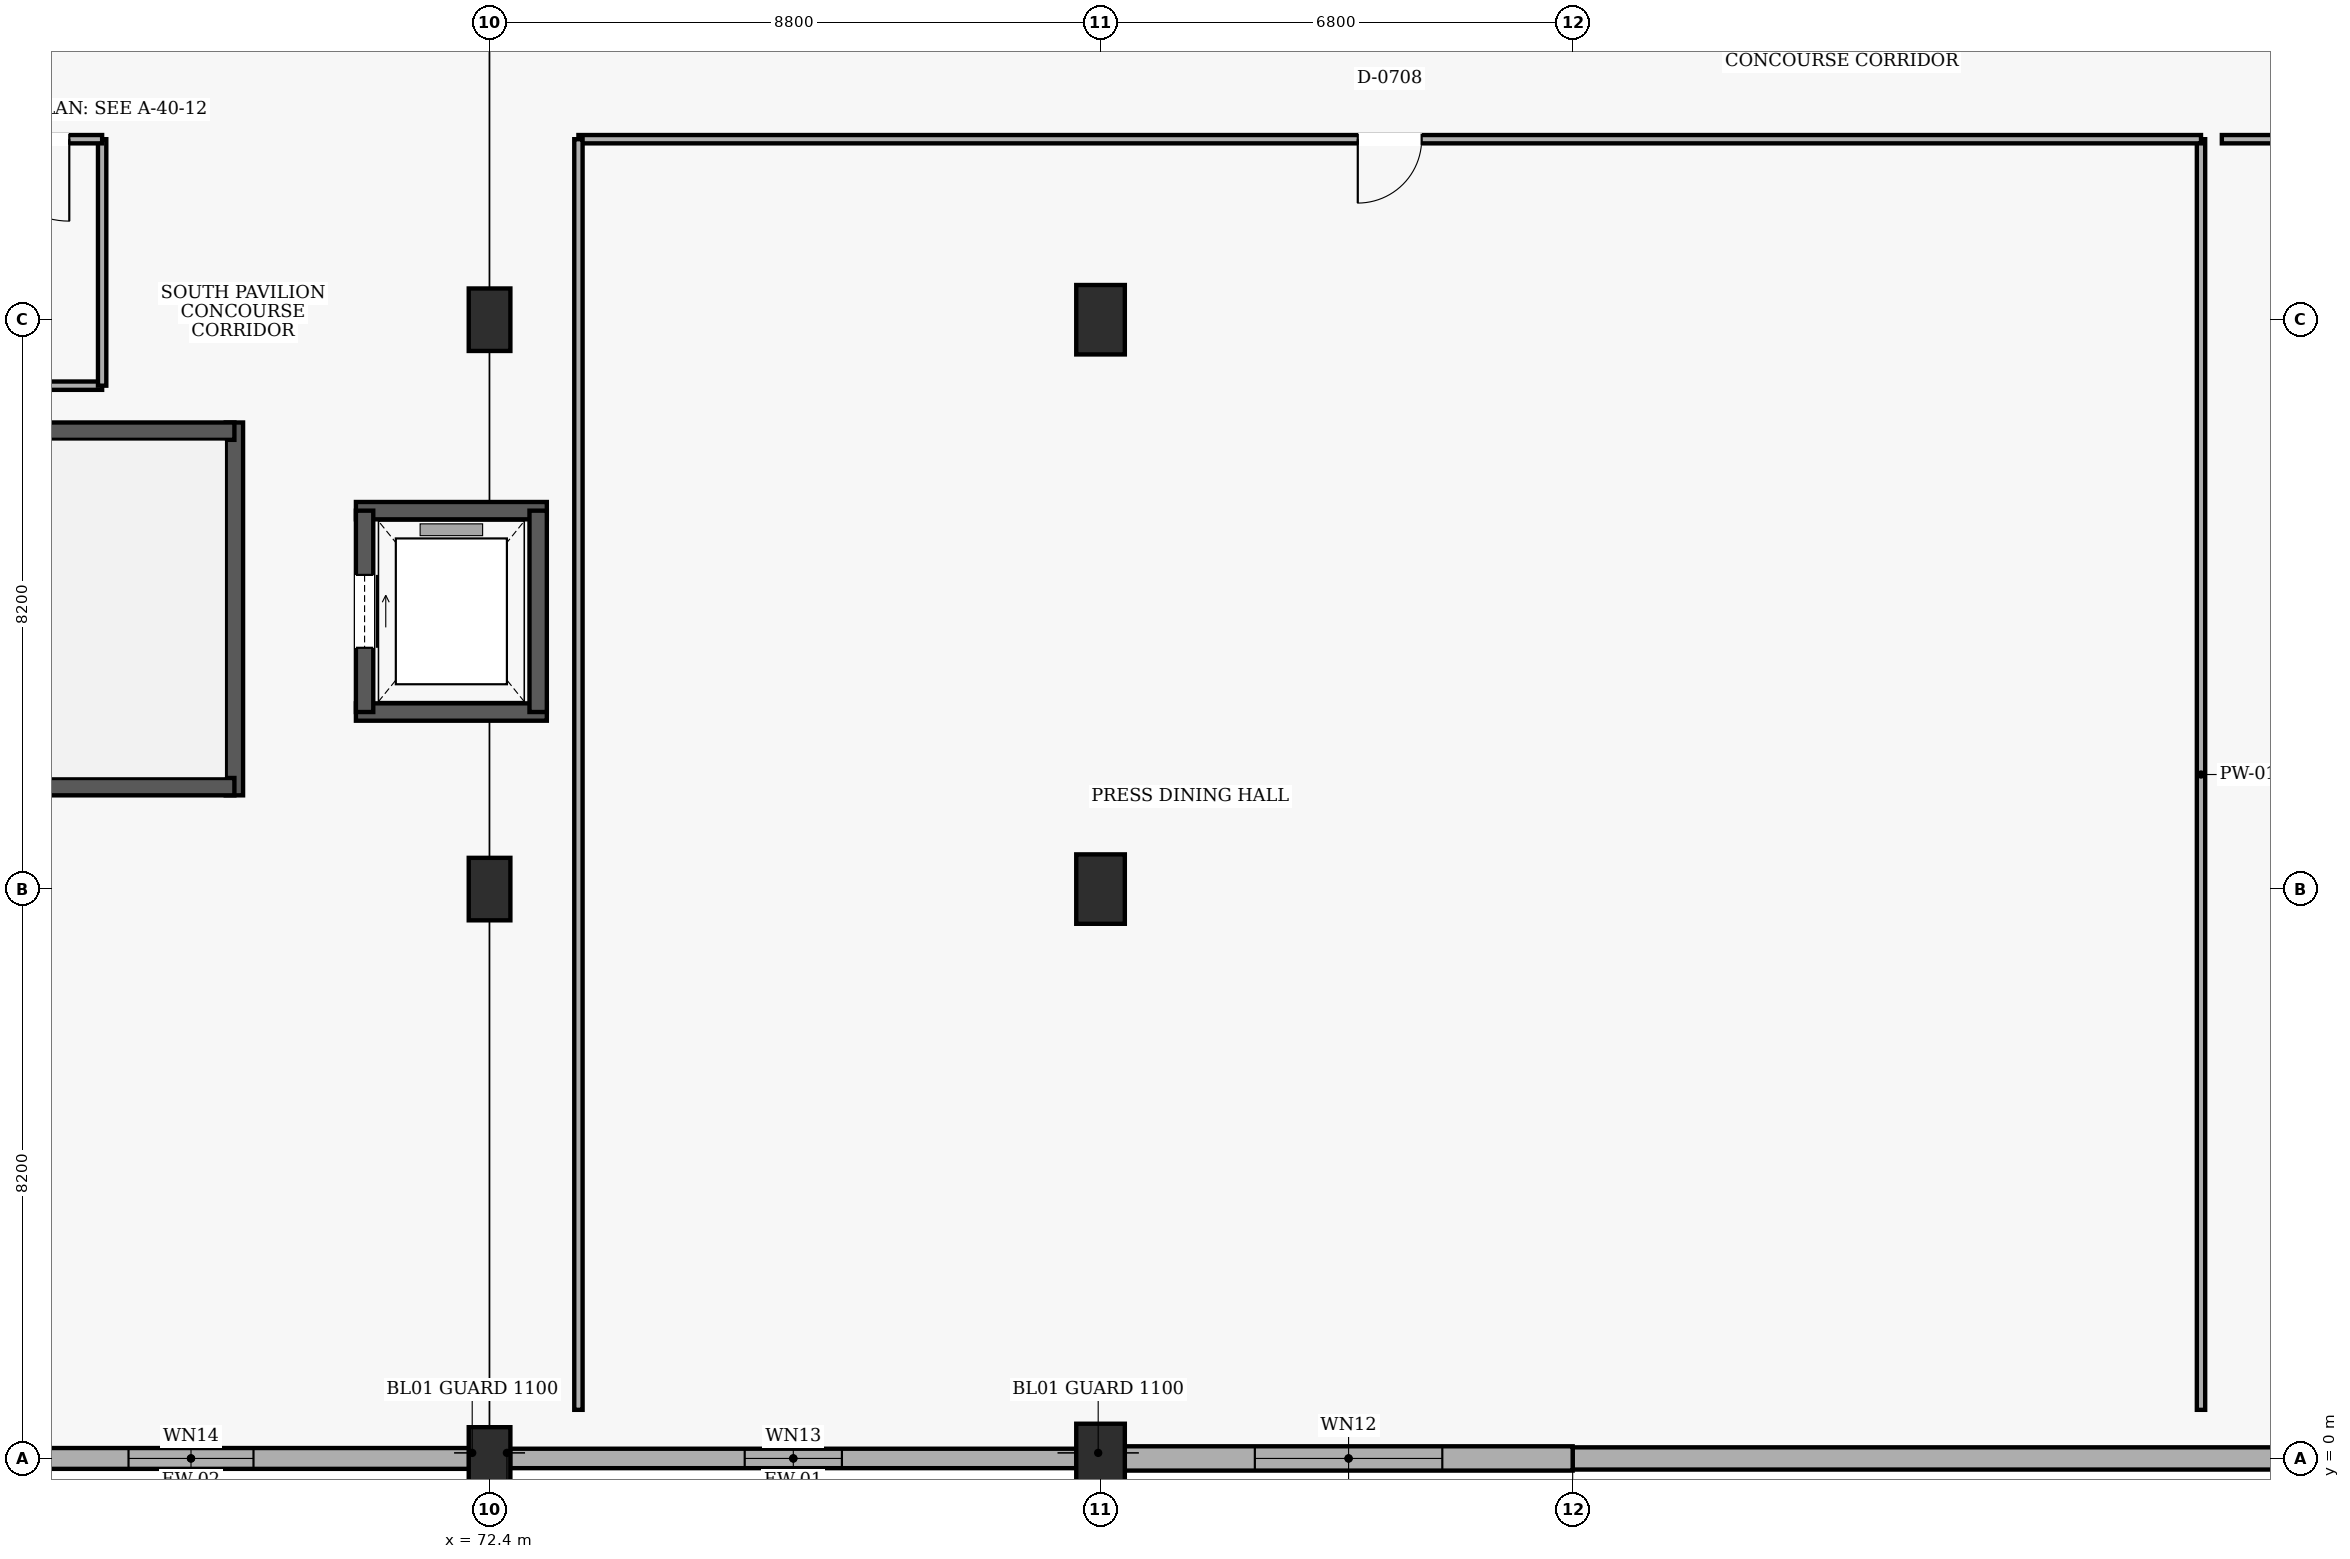
"""IFC4 building model, lengths in metres.
Left out: names, types, materials, properties, quantities, classifications, styles, units other than length and angle.
Written with IfcOpenShell. Run it as: python <this file> out.ifc"""

import sys

from ifc_helpers import new_model, si_unit, direction, frame, frame_2d, origin, origin_2d, place, context, subcontext, project, spatial, rectangle, extrude, element, fill, save


model = new_model("IFC4")
c1 = context("Model", 3, precision=1e-05, world=origin(), true_north=direction((0.0, 1.0)))
c2 = subcontext(c1, "Body", "Model", "MODEL_VIEW")
j1 = project(units=[si_unit("LENGTHUNIT", "METRE"), si_unit("PLANEANGLEUNIT", "RADIAN")], contexts=[c1])
p1 = place(None, origin())
s1 = spatial("IfcSite", under=j1, at=p1, CompositionType="ELEMENT")
p2 = place(p1, origin())
s2 = spatial("IfcBuilding", under=s1, at=p2, CompositionType="ELEMENT")
p3 = place(p2, frame((0.0, 0.0, 15.0)))
s3 = spatial("IfcBuildingStorey", under=s2, at=p3, CompositionType="ELEMENT", Elevation=15.0)
for number, where, z_axis, x_axis in (
    (1, (72.4, 0.0, 0.0), (0.0, 0.0, 1.0), (1.0, 0.0, 0.0)),
    (2, (72.4, 8.2, 0.0), (0.0, 0.0, 1.0), (1.0, 0.0, 0.0)),
    (3, (72.4, 16.4, 0.0), (0.0, 0.0, 1.0), (1.0, 0.0, 0.0)),
):
    element("IfcColumn", number, at=place(p3, frame(where, z_axis=z_axis, x_axis=x_axis)), inside=s3, PredefinedType="COLUMN", context=c2, shape_type="SweptSolid", body=[
        extrude(rectangle(XDim=0.6, YDim=0.9, at=origin_2d()), origin(), (0.0, 0.0, 1.0), 4.8),
    ])
for number, where, z_axis, x_axis in (
    (4, (81.2, 0.0, 0.0), (0.0, 0.0, 1.0), (1.0, 0.0, 0.0)),
    (5, (81.2, 8.2, 0.0), (0.0, 0.0, 1.0), (1.0, 0.0, 0.0)),
    (6, (81.2, 16.4, 0.0), (0.0, 0.0, 1.0), (1.0, 0.0, 0.0)),
):
    element("IfcColumn", number, at=place(p3, frame(where, z_axis=z_axis, x_axis=x_axis)), inside=s3, PredefinedType="COLUMN", context=c2, shape_type="SweptSolid", body=[
        extrude(rectangle(XDim=0.7, YDim=1.0, at=origin_2d()), origin(), (0.0, 0.0, 1.0), 4.8),
    ])
p4 = place(p3, frame((122.0, 0.0, 0.0), z_axis=(0.0, 0.0, 1.0), x_axis=(-1.0, 0.0, 0.0)))
e7 = element("IfcWall", 7, at=p4, inside=s3, PredefinedType="SOLIDWALL", context=c2, shape_type="SweptSolid", body=[
    extrude(rectangle(XDim=34.0, YDim=0.32, at=frame_2d((17.0, 0.0))), origin(), (0.0, 0.0, 1.0), 4.48),
])
p5 = place(p4, frame((15.8, 0.0, 0.9)))
e8 = element("IfcOpeningElement", 8, at=p5, cuts=e7, PredefinedType="OPENING", context=c2, shape_type="SweptSolid", body=[
    extrude(rectangle(XDim=2.4, YDim=1.8, at=frame_2d((1.2, 0.9))), frame((0.0, 0.17, 0.0), z_axis=(0.0, -1.0, 0.0), x_axis=(1.0, 0.0, 0.0)), (0.0, 0.0, 1.0), 0.34),
])
p6 = place(p3, frame((88.0, 0.0, 0.0), z_axis=(0.0, 0.0, 1.0), x_axis=(-1.0, 0.0, 0.0)))
e9 = element("IfcWall", 9, at=p6, inside=s3, PredefinedType="SOLIDWALL", context=c2, shape_type="SweptSolid", body=[
    extrude(rectangle(XDim=6.455, YDim=0.35, at=frame_2d((3.228, 0.0))), origin(), (0.0, 0.0, 1.0), 4.48),
])
p7 = place(p6, frame((1.877, 0.0, 0.9)))
e10 = element("IfcOpeningElement", 10, at=p7, cuts=e9, PredefinedType="OPENING", context=c2, shape_type="SweptSolid", body=[
    extrude(rectangle(XDim=2.7, YDim=1.8, at=frame_2d((1.35, 0.9))), frame((0.0, 0.185, 0.0), z_axis=(0.0, -1.0, 0.0), x_axis=(1.0, 0.0, 0.0)), (0.0, 0.0, 1.0), 0.37),
])
p8 = place(p3, frame((80.855, 0.0, 0.0), z_axis=(0.0, 0.0, 1.0), x_axis=(-1.0, 0.0, 0.0)))
e11 = element("IfcWall", 11, at=p8, inside=s3, PredefinedType="SOLIDWALL", context=c2, shape_type="SweptSolid", body=[
    extrude(rectangle(XDim=8.16, YDim=0.28, at=frame_2d((4.08, 0.0))), origin(), (0.0, 0.0, 1.0), 3.78),
])
p9 = place(p8, frame((3.38, 0.0, 0.9)))
e12 = element("IfcOpeningElement", 12, at=p9, cuts=e11, PredefinedType="OPENING", context=c2, shape_type="SweptSolid", body=[
    extrude(rectangle(XDim=1.4, YDim=2.1, at=frame_2d((0.7, 1.05))), frame((0.0, 0.15, 0.0), z_axis=(0.0, -1.0, 0.0), x_axis=(1.0, 0.0, 0.0)), (0.0, 0.0, 1.0), 0.3),
])
p10 = place(p3, frame((72.105, 0.0, 0.0), z_axis=(0.0, 0.0, 1.0), x_axis=(-1.0, 0.0, 0.0)))
e13 = element("IfcWall", 13, at=p10, inside=s3, PredefinedType="SOLIDWALL", context=c2, shape_type="SweptSolid", body=[
    extrude(rectangle(XDim=8.01, YDim=0.3, at=frame_2d((4.005, 0.0))), origin(), (0.0, 0.0, 1.0), 3.78),
])
p11 = place(p10, frame((3.105, 0.0, 0.9)))
e14 = element("IfcOpeningElement", 14, at=p11, cuts=e13, PredefinedType="OPENING", context=c2, shape_type="SweptSolid", body=[
    extrude(rectangle(XDim=1.8, YDim=2.1, at=frame_2d((0.9, 1.05))), frame((0.0, 0.16, 0.0), z_axis=(0.0, -1.0, 0.0), x_axis=(1.0, 0.0, 0.0)), (0.0, 0.0, 1.0), 0.32),
])
p12 = place(p3, frame((68.725, 9.55, 0.0), z_axis=(0.0, 0.0, 1.0), x_axis=(0.0, 1.0, 0.0)))
e15 = element("IfcWall", 15, at=p12, inside=s3, PredefinedType="SHEAR", context=c2, shape_type="SweptSolid", body=[
    extrude(rectangle(XDim=5.37, YDim=0.25, at=frame_2d((2.685, 0.0))), origin(), (0.0, 0.0, 1.0), 4.5),
])
p13 = place(p3, frame((57.875, 14.795, 0.0), z_axis=(0.0, 0.0, 1.0), x_axis=(1.0, 0.0, 0.0)))
e16 = element("IfcWall", 16, at=p13, inside=s3, PredefinedType="SHEAR", context=c2, shape_type="SweptSolid", body=[
    extrude(rectangle(XDim=10.85, YDim=0.25, at=frame_2d((5.425, 0.0))), origin(), (0.0, 0.0, 1.0), 4.5),
])
p14 = place(p13, frame((0.52, 0.0, 0.0)))
e17 = element("IfcOpeningElement", 17, at=p14, cuts=e16, PredefinedType="OPENING", context=c2, shape_type="SweptSolid", body=[
    extrude(rectangle(XDim=1.4, YDim=2.15, at=frame_2d((0.7, 1.075))), frame((0.0, 0.135, 0.0), z_axis=(0.0, -1.0, 0.0), x_axis=(1.0, 0.0, 0.0)), (0.0, 0.0, 1.0), 0.27),
])
p15 = place(p3, frame((57.875, 9.675, 0.0), z_axis=(0.0, 0.0, 1.0), x_axis=(1.0, 0.0, 0.0)))
e18 = element("IfcWall", 18, at=p15, inside=s3, PredefinedType="SHEAR", context=c2, shape_type="SweptSolid", body=[
    extrude(rectangle(XDim=10.85, YDim=0.25, at=frame_2d((5.425, 0.0))), origin(), (0.0, 0.0, 1.0), 4.5),
])
for number, where, z_axis, x_axis in (
    (19, (70.475, 10.75, 0.0), (0.0, 0.0, 1.0), (1.0, 0.0, 0.0)),
    (20, (73.225, 13.65, 0.0), (0.0, 0.0, 1.0), (-1.0, 0.0, 0.0)),
):
    element("IfcWall", number, at=place(p3, frame(where, z_axis=z_axis, x_axis=x_axis)), inside=s3, PredefinedType="SHEAR", context=c2, shape_type="SweptSolid", body=[
        extrude(rectangle(XDim=2.75, YDim=0.25, at=frame_2d((1.375, 0.0))), origin(), (0.0, 0.0, 1.0), 4.5),
    ])
p16 = place(p3, frame((70.6, 13.65, 0.0), z_axis=(0.0, 0.0, 1.0), x_axis=(0.0, -1.0, 0.0)))
e21 = element("IfcWall", 21, at=p16, inside=s3, PredefinedType="SHEAR", context=c2, shape_type="SweptSolid", body=[
    extrude(rectangle(XDim=2.9, YDim=0.25, at=frame_2d((1.45, 0.0))), origin(), (0.0, 0.0, 1.0), 4.5),
])
p17 = place(p16, frame((0.925, 0.0, 0.0)))
e22 = element("IfcOpeningElement", 22, at=p17, cuts=e21, PredefinedType="OPENING", context=c2, shape_type="SweptSolid", body=[
    extrude(rectangle(XDim=1.05, YDim=2.15, at=frame_2d((0.525, 1.075))), frame((0.0, 0.135, 0.0), z_axis=(0.0, -1.0, 0.0), x_axis=(1.0, 0.0, 0.0)), (0.0, 0.0, 1.0), 0.27),
])
p18 = place(p3, frame((73.1, 10.75, 0.0), z_axis=(0.0, 0.0, 1.0), x_axis=(0.0, 1.0, 0.0)))
e23 = element("IfcWall", 23, at=p18, inside=s3, PredefinedType="SHEAR", context=c2, shape_type="SweptSolid", body=[
    extrude(rectangle(XDim=2.9, YDim=0.25, at=frame_2d((1.45, 0.0))), origin(), (0.0, 0.0, 1.0), 4.5),
])
p19 = place(p3, frame((60.68, 15.45, 0.0), z_axis=(0.0, 0.0, 1.0), x_axis=(1.0, 0.0, 0.0)))
e24 = element("IfcWall", 24, at=p19, inside=s3, PredefinedType="PARTITIONING", context=c2, shape_type="SweptSolid", body=[
    extrude(rectangle(XDim=6.14, YDim=0.12, at=frame_2d((3.07, 0.0))), origin(), (0.0, 0.0, 1.0), 4.5),
])
p20 = place(p3, frame((66.82, 15.45, 0.0), z_axis=(0.0, 0.0, 1.0), x_axis=(0.0, 1.0, 0.0)))
e25 = element("IfcWall", 25, at=p20, inside=s3, PredefinedType="PARTITIONING", context=c2, shape_type="SweptSolid", body=[
    extrude(rectangle(XDim=3.55, YDim=0.12, at=frame_2d((1.775, 0.0))), origin(), (0.0, 0.0, 1.0), 4.5),
])
p21 = place(p3, frame((66.82, 19.0, 0.0), z_axis=(0.0, 0.0, 1.0), x_axis=(-1.0, 0.0, 0.0)))
e26 = element("IfcWall", 26, at=p21, inside=s3, PredefinedType="PARTITIONING", context=c2, shape_type="SweptSolid", body=[
    extrude(rectangle(XDim=6.14, YDim=0.12, at=frame_2d((3.07, 0.0))), origin(), (0.0, 0.0, 1.0), 4.5),
])
p22 = place(p21, frame((0.473, 0.0, 0.0)))
e27 = element("IfcOpeningElement", 27, at=p22, cuts=e26, PredefinedType="OPENING", context=c2, shape_type="SweptSolid", body=[
    extrude(rectangle(XDim=2.36, YDim=2.4, at=frame_2d((1.18, 1.2))), frame((0.0, 0.07, 0.0), z_axis=(0.0, -1.0, 0.0), x_axis=(1.0, 0.0, 0.0)), (0.0, 0.0, 1.0), 0.14),
])
p23 = place(p3, frame((97.05, 0.7, 0.0), z_axis=(0.0, 0.0, 1.0), x_axis=(0.0, 1.0, 0.0)))
e28 = element("IfcWall", 28, at=p23, inside=s3, PredefinedType="PARTITIONING", context=c2, shape_type="SweptSolid", body=[
    extrude(rectangle(XDim=18.3, YDim=0.12, at=frame_2d((9.15, 0.0))), origin(), (0.0, 0.0, 1.0), 4.5),
])
p24 = place(p3, frame((97.05, 19.0, 0.0), z_axis=(0.0, 0.0, 1.0), x_axis=(-1.0, 0.0, 0.0)))
e29 = element("IfcWall", 29, at=p24, inside=s3, PredefinedType="PARTITIONING", context=c2, shape_type="SweptSolid", body=[
    extrude(rectangle(XDim=23.37, YDim=0.12, at=frame_2d((11.685, 0.0))), origin(), (0.0, 0.0, 1.0), 4.5),
])
p25 = place(p24, frame((11.225, 0.0, 0.0)))
e30 = element("IfcOpeningElement", 30, at=p25, cuts=e29, PredefinedType="OPENING", context=c2, shape_type="SweptSolid", body=[
    extrude(rectangle(XDim=0.92, YDim=2.1, at=frame_2d((0.46, 1.05))), frame((0.0, 0.07, 0.0), z_axis=(0.0, -1.0, 0.0), x_axis=(1.0, 0.0, 0.0)), (0.0, 0.0, 1.0), 0.14),
])
p26 = place(p3, frame((73.68, 19.0, 0.0), z_axis=(0.0, 0.0, 1.0), x_axis=(0.0, -1.0, 0.0)))
e31 = element("IfcWall", 31, at=p26, inside=s3, PredefinedType="PARTITIONING", context=c2, shape_type="SweptSolid", body=[
    extrude(rectangle(XDim=18.3, YDim=0.12, at=frame_2d((9.15, 0.0))), origin(), (0.0, 0.0, 1.0), 4.5),
])
p27 = place(p3, frame((121.73, 19.0, 0.0), z_axis=(0.0, 0.0, 1.0), x_axis=(-1.0, 0.0, 0.0)))
e32 = element("IfcWall", 32, at=p27, inside=s3, PredefinedType="PARTITIONING", context=c2, shape_type="SweptSolid", body=[
    extrude(rectangle(XDim=24.38, YDim=0.12, at=frame_2d((12.19, 0.0))), origin(), (0.0, 0.0, 1.0), 4.5),
])
p28 = place(p27, frame((11.71, 0.0, 0.0)))
e33 = element("IfcOpeningElement", 33, at=p28, cuts=e32, PredefinedType="OPENING", context=c2, shape_type="SweptSolid", body=[
    extrude(rectangle(XDim=0.96, YDim=2.1, at=frame_2d((0.48, 1.05))), frame((0.0, 0.07, 0.0), z_axis=(0.0, -1.0, 0.0), x_axis=(1.0, 0.0, 0.0)), (0.0, 0.0, 1.0), 0.14),
])
p29 = place(p7, origin())
e34 = element("IfcWindow", 34, at=p29, inside=s3, PartitioningType="SINGLE_PANEL", PredefinedType="WINDOW", context=c2, shape_type="SweptSolid", body=[
    extrude(rectangle(XDim=2.7, YDim=1.8, at=frame_2d((1.35, 0.9))), frame((0.0, 0.03, 0.0), z_axis=(0.0, -1.0, 0.0), x_axis=(1.0, 0.0, 0.0)), (0.0, 0.0, 1.0), 0.06),
])
fill(e10, e34)
p30 = place(p9, origin())
e35 = element("IfcWindow", 35, at=p30, inside=s3, PartitioningType="SINGLE_PANEL", PredefinedType="WINDOW", context=c2, shape_type="SweptSolid", body=[
    extrude(rectangle(XDim=1.4, YDim=2.1, at=frame_2d((0.7, 1.05))), frame((0.0, 0.03, 0.0), z_axis=(0.0, -1.0, 0.0), x_axis=(1.0, 0.0, 0.0)), (0.0, 0.0, 1.0), 0.06),
])
fill(e12, e35)
p31 = place(p11, origin())
e36 = element("IfcWindow", 36, at=p31, inside=s3, PartitioningType="SINGLE_PANEL", PredefinedType="WINDOW", context=c2, shape_type="SweptSolid", body=[
    extrude(rectangle(XDim=1.8, YDim=2.1, at=frame_2d((0.9, 1.05))), frame((0.0, 0.03, 0.0), z_axis=(0.0, -1.0, 0.0), x_axis=(1.0, 0.0, 0.0)), (0.0, 0.0, 1.0), 0.06),
])
fill(e14, e36)
p32 = place(p17, origin())
e37 = element("IfcDoor", 37, at=p32, inside=s3, OperationType="SLIDING_TO_RIGHT", PredefinedType="DOOR", context=c2, shape_type="SweptSolid", body=[
    extrude(rectangle(XDim=1.05, YDim=2.15, at=frame_2d((0.525, 1.075))), frame((0.0, 0.025, 0.0), z_axis=(0.0, -1.0, 0.0), x_axis=(1.0, 0.0, 0.0)), (0.0, 0.0, 1.0), 0.05),
])
fill(e22, e37)
p33 = place(p22, origin())
e38 = element("IfcDoor", 38, at=p33, inside=s3, OperationType="DOUBLE_DOOR_SINGLE_SWING", PredefinedType="DOOR", context=c2, shape_type="SweptSolid", body=[
    extrude(rectangle(XDim=2.36, YDim=2.4, at=frame_2d((1.18, 1.2))), frame((0.0, 0.025, 0.0), z_axis=(0.0, -1.0, 0.0), x_axis=(1.0, 0.0, 0.0)), (0.0, 0.0, 1.0), 0.05),
])
fill(e27, e38)
p34 = place(p25, origin())
e39 = element("IfcDoor", 39, at=p34, inside=s3, OperationType="SINGLE_SWING_RIGHT", PredefinedType="DOOR", context=c2, shape_type="SweptSolid", body=[
    extrude(rectangle(XDim=0.92, YDim=2.1, at=frame_2d((0.46, 1.05))), frame((0.0, 0.025, 0.0), z_axis=(0.0, -1.0, 0.0), x_axis=(1.0, 0.0, 0.0)), (0.0, 0.0, 1.0), 0.05),
])
fill(e30, e39)
save(model, sys.argv[1])
